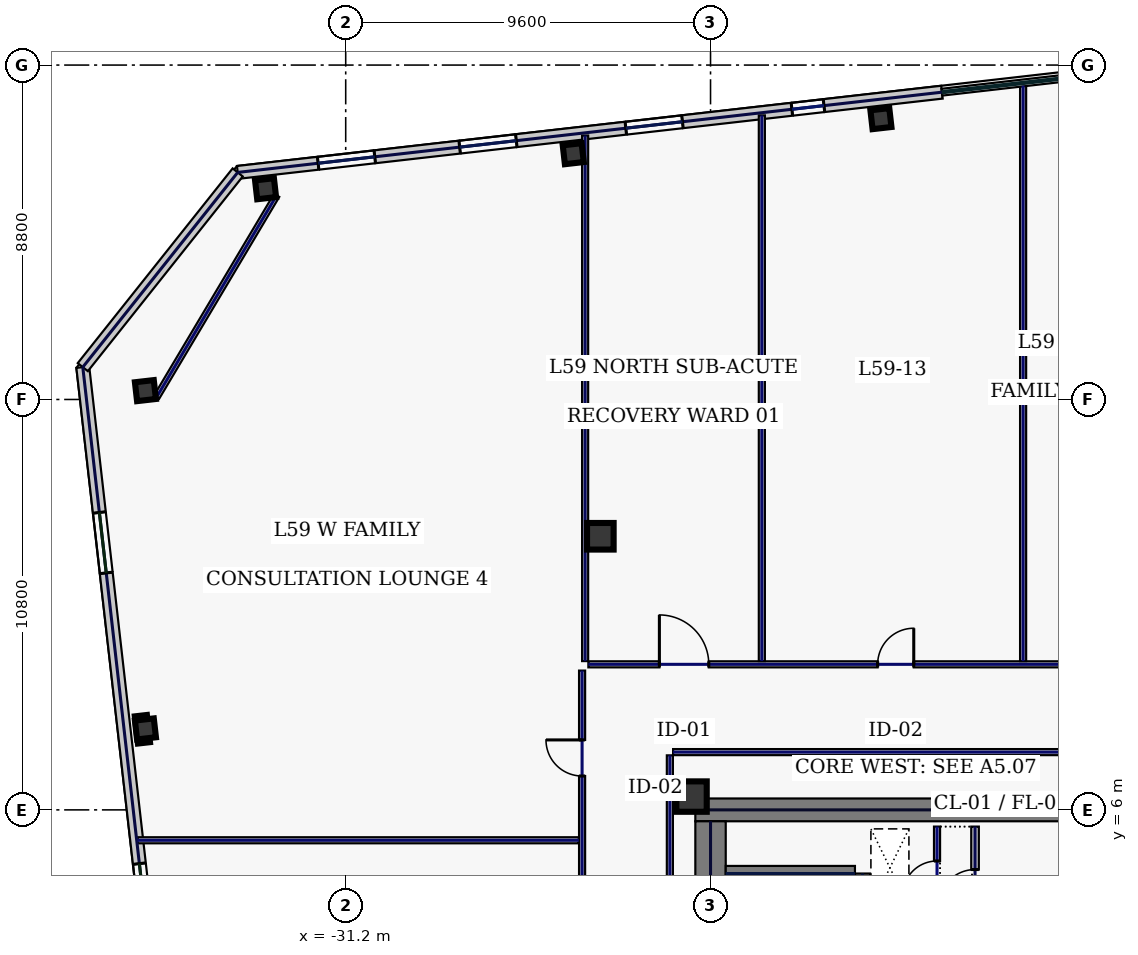
"""IFC4 building model, lengths in metres.
Left out: names, types, materials, properties, quantities, classifications, styles, units other than length and angle.
Written with IfcOpenShell. Run it as: python <this file> out.ifc"""

import sys

from ifc_helpers import new_model, si_unit, direction, frame, frame_2d, origin, origin_2d, place, context, subcontext, project, spatial, rectangle, hollow_rectangle, extrude, element, fill, save


model = new_model("IFC4")
c1 = context("Model", 3, precision=1e-05, world=origin(), true_north=direction((0.0, 1.0)))
c2 = subcontext(c1, "Body", "Model", "MODEL_VIEW")
j1 = project(units=[si_unit("LENGTHUNIT", "METRE"), si_unit("PLANEANGLEUNIT", "RADIAN")], contexts=[c1])
p1 = place(None, origin())
s1 = spatial("IfcSite", under=j1, at=p1, CompositionType="ELEMENT")
p2 = place(p1, origin())
s2 = spatial("IfcBuilding", under=s1, at=p2, CompositionType="ELEMENT")
p3 = place(p2, frame((0.0, 0.0, 255.0)))
s3 = spatial("IfcBuildingStorey", under=s2, at=p3, CompositionType="ELEMENT", Elevation=255.0)
p4 = place(p3, frame((-22.0, 6.0, 0.0), z_axis=(0.0, 0.0, 1.0), x_axis=(1.0, 0.0, 0.0)))
e1 = element("IfcWall", 1, at=p4, inside=s3, PredefinedType="SHEAR", context=c2, shape_type="SweptSolid", body=[
    extrude(rectangle(XDim=11.5, YDim=0.6, at=frame_2d((5.75, 0.0))), origin(), (0.0, 0.0, 1.0), 3.74),
])
p5 = place(p3, frame((-21.6, -5.7, 0.0), z_axis=(0.0, 0.0, 1.0), x_axis=(0.0, 1.0, 0.0)))
e2 = element("IfcWall", 2, at=p5, inside=s3, PredefinedType="SHEAR", context=c2, shape_type="SweptSolid", body=[
    extrude(rectangle(XDim=11.4, YDim=0.8, at=frame_2d((5.7, 0.0))), origin(), (0.0, 0.0, 1.0), 3.74),
])
p6 = place(p3, frame((-17.6, -4.325, 0.0), z_axis=(0.0, 0.0, 1.0), x_axis=(0.0, 1.0, 0.0)))
e3 = element("IfcWall", 3, at=p6, inside=s3, PredefinedType="SHEAR", context=c2, shape_type="SweptSolid", body=[
    extrude(rectangle(XDim=8.65, YDim=0.4, at=frame_2d((4.325, 0.0))), origin(), (0.0, 0.0, 1.0), 3.74),
])
p7 = place(p6, frame((0.25, 0.0, 0.0)))
e4 = element("IfcOpeningElement", 4, at=p7, cuts=e3, PredefinedType="OPENING", context=c2, shape_type="SweptSolid", body=[
    extrude(rectangle(XDim=1.1, YDim=2.2, at=frame_2d((0.55, 1.1))), frame((0.0, 0.21, 0.0), z_axis=(0.0, -1.0, 0.0), x_axis=(1.0, 0.0, 0.0)), (0.0, 0.0, 1.0), 0.42),
])
p8 = place(p3, frame((-21.2, 4.325, 0.0), z_axis=(0.0, 0.0, 1.0), x_axis=(1.0, 0.0, 0.0)))
e5 = element("IfcWall", 5, at=p8, inside=s3, PredefinedType="SHEAR", context=c2, shape_type="SweptSolid", body=[
    extrude(rectangle(XDim=3.4, YDim=0.4, at=frame_2d((1.7, 0.0))), origin(), (0.0, 0.0, 1.0), 3.74),
])
p9 = place(p3, frame((-22.1, 6.35, 0.0), z_axis=(0.0, 0.0, 1.0), x_axis=(1.0, 0.0, 0.0)))
e6 = element("IfcColumn", 6, at=p9, inside=s3, PredefinedType="COLUMN", context=c2, shape_type="SweptSolid", body=[
    extrude(hollow_rectangle(XDim=0.8, YDim=0.8, WallThickness=0.036, at=origin_2d()), origin(), (0.0, 0.0, 1.0), 3.74),
])
p10 = place(p3, frame((-24.5, 13.2, 0.0), z_axis=(0.0, 0.0, 1.0), x_axis=(1.0, 0.0, 0.0)))
e7 = element("IfcColumn", 7, at=p10, inside=s3, PredefinedType="COLUMN", context=c2, shape_type="SweptSolid", body=[
    extrude(hollow_rectangle(XDim=0.7, YDim=0.7, WallThickness=0.032, at=origin_2d()), origin(), (0.0, 0.0, 1.0), 3.74),
])
for number, where, z_axis, x_axis in (
    (8, (-17.116, 24.19, 0.0), (0.0, 0.0, 1.0), (0.994, 0.113, 0.0)),
    (9, (-25.212, 23.268, 0.0), (0.0, 0.0, 1.0), (0.994, 0.113, 0.0)),
    (10, (-33.309, 22.345, 0.0), (0.0, 0.0, 1.0), (0.994, 0.113, 0.0)),
    (11, (-36.47, 17.033, 0.0), (0.0, 0.0, 1.0), (0.994, 0.113, 0.0)),
    (12, (-36.47, 8.131, 0.0), (0.0, 0.0, 1.0), (0.994, 0.113, 0.0)),
):
    element("IfcColumn", number, at=place(p3, frame(where, z_axis=z_axis, x_axis=x_axis)), inside=s3, PredefinedType="COLUMN", context=c2, shape_type="SweptSolid", body=[
        extrude(hollow_rectangle(XDim=0.5, YDim=0.5, WallThickness=0.025, at=origin_2d()), origin(), (0.0, 0.0, 1.0), 3.74),
    ])
p11 = place(p3, frame((-15.51, 24.886, 0.0), z_axis=(0.0, 0.0, 1.0), x_axis=(-0.993572271362, -0.113199565282, 0.0)))
e13 = element("IfcWall", 13, at=p11, inside=s3, PredefinedType="STANDARD", context=c2, shape_type="SweptSolid", body=[
    extrude(rectangle(XDim=18.651, YDim=0.34, at=frame_2d((9.326, 0.0))), origin(), (0.0, 0.0, 1.0), 3.74),
])
p12 = place(p11, frame((15.021, 0.0, 0.83)))
e14 = element("IfcOpeningElement", 14, at=p12, cuts=e13, PredefinedType="OPENING", context=c2, shape_type="SweptSolid", body=[
    extrude(rectangle(XDim=1.5, YDim=2.0, at=frame_2d((0.75, 1.0))), frame((0.0, 0.18, 0.0), z_axis=(0.0, -1.0, 0.0), x_axis=(1.0, 0.0, 0.0)), (0.0, 0.0, 1.0), 0.36),
])
p13 = place(p11, frame((11.273, 0.0, 0.83)))
e15 = element("IfcOpeningElement", 15, at=p13, cuts=e13, PredefinedType="OPENING", context=c2, shape_type="SweptSolid", body=[
    extrude(rectangle(XDim=1.5, YDim=2.0, at=frame_2d((0.75, 1.0))), frame((0.0, 0.18, 0.0), z_axis=(0.0, -1.0, 0.0), x_axis=(1.0, 0.0, 0.0)), (0.0, 0.0, 1.0), 0.36),
])
p14 = place(p11, frame((6.873, 0.0, 0.83)))
e16 = element("IfcOpeningElement", 16, at=p14, cuts=e13, PredefinedType="OPENING", context=c2, shape_type="SweptSolid", body=[
    extrude(rectangle(XDim=1.5, YDim=2.0, at=frame_2d((0.75, 1.0))), frame((0.0, 0.18, 0.0), z_axis=(0.0, -1.0, 0.0), x_axis=(1.0, 0.0, 0.0)), (0.0, 0.0, 1.0), 0.36),
])
p15 = place(p11, frame((3.125, 0.0, 0.83)))
e17 = element("IfcOpeningElement", 17, at=p15, cuts=e13, PredefinedType="OPENING", context=c2, shape_type="SweptSolid", body=[
    extrude(rectangle(XDim=0.85, YDim=1.85, at=frame_2d((0.425, 0.925))), frame((0.0, 0.18, 0.0), z_axis=(0.0, -1.0, 0.0), x_axis=(1.0, 0.0, 0.0)), (0.0, 0.0, 1.0), 0.36),
])
p16 = place(p3, frame((-38.118, 17.651, 0.0), z_axis=(0.0, 0.0, 1.0), x_axis=(0.11320360501, -0.9935718111, 0.0)))
e18 = element("IfcWall", 18, at=p16, inside=s3, PredefinedType="STANDARD", context=c2, shape_type="SweptSolid", body=[
    extrude(rectangle(XDim=37.2, YDim=0.34, at=frame_2d((18.6, 0.0))), origin(), (0.0, 0.0, 1.0), 3.74),
])
p17 = place(p16, frame((3.85, 0.0, 0.58)))
e19 = element("IfcOpeningElement", 19, at=p17, cuts=e18, PredefinedType="OPENING", context=c2, shape_type="SweptSolid", body=[
    extrude(rectangle(XDim=1.6, YDim=2.3, at=frame_2d((0.8, 1.15))), frame((0.0, 0.18, 0.0), z_axis=(0.0, -1.0, 0.0), x_axis=(1.0, 0.0, 0.0)), (0.0, 0.0, 1.0), 0.36),
])
p18 = place(p16, frame((13.15, 0.0, 0.58)))
e20 = element("IfcOpeningElement", 20, at=p18, cuts=e18, PredefinedType="OPENING", context=c2, shape_type="SweptSolid", body=[
    extrude(rectangle(XDim=1.6, YDim=2.3, at=frame_2d((0.8, 1.15))), frame((0.0, 0.18, 0.0), z_axis=(0.0, -1.0, 0.0), x_axis=(1.0, 0.0, 0.0)), (0.0, 0.0, 1.0), 0.36),
])
p19 = place(p16, frame((31.75, 0.0, 0.58)))
e21 = element("IfcOpeningElement", 21, at=p19, cuts=e18, PredefinedType="OPENING", context=c2, shape_type="SweptSolid", body=[
    extrude(rectangle(XDim=1.6, YDim=2.3, at=frame_2d((0.8, 1.15))), frame((0.0, 0.18, 0.0), z_axis=(0.0, -1.0, 0.0), x_axis=(1.0, 0.0, 0.0)), (0.0, 0.0, 1.0), 0.36),
])
p20 = place(p3, frame((-34.042, 22.775, 0.0), z_axis=(0.0, 0.0, 1.0), x_axis=(-0.62252823689, -0.78259733853, 0.0)))
e22 = element("IfcWall", 22, at=p20, inside=s3, PredefinedType="STANDARD", context=c2, shape_type="SweptSolid", body=[
    extrude(rectangle(XDim=6.548, YDim=0.34, at=frame_2d((3.274, 0.0))), origin(), (0.0, 0.0, 1.0), 3.74),
])
p21 = place(p3, frame((-15.64, 3.405, 0.0), z_axis=(0.0, 0.0, 1.0), x_axis=(0.0, 1.0, 0.0)))
e23 = element("IfcWall", 23, at=p21, inside=s3, PredefinedType="PARTITIONING", context=c2, shape_type="SweptSolid", body=[
    extrude(rectangle(XDim=2.155, YDim=0.16, at=frame_2d((1.078, 0.0))), origin(), (0.0, 0.0, 1.0), 3.74),
])
p22 = place(p21, frame((0.35, 0.0, 0.0)))
e24 = element("IfcOpeningElement", 24, at=p22, cuts=e23, PredefinedType="OPENING", context=c2, shape_type="SweptSolid", body=[
    extrude(rectangle(XDim=0.9, YDim=2.2, at=frame_2d((0.45, 1.1))), frame((0.0, 0.09, 0.0), z_axis=(0.0, -1.0, 0.0), x_axis=(1.0, 0.0, 0.0)), (0.0, 0.0, 1.0), 0.18),
])
p23 = place(p3, frame((-14.64, 2.96, 0.0), z_axis=(0.0, 0.0, 1.0), x_axis=(0.0, 1.0, 0.0)))
e25 = element("IfcWall", 25, at=p23, inside=s3, PredefinedType="SOLIDWALL", context=c2, shape_type="SweptSolid", body=[
    extrude(rectangle(XDim=2.6, YDim=0.2, at=frame_2d((1.3, 0.0))), origin(), (0.0, 0.0, 1.0), 3.74),
])
p24 = place(p23, frame((0.52, 0.0, 0.0)))
e26 = element("IfcOpeningElement", 26, at=p24, cuts=e25, PredefinedType="OPENING", context=c2, shape_type="SweptSolid", body=[
    extrude(rectangle(XDim=0.95, YDim=2.2, at=frame_2d((0.475, 1.1))), frame((0.0, 0.11, 0.0), z_axis=(0.0, -1.0, 0.0), x_axis=(1.0, 0.0, 0.0)), (0.0, 0.0, 1.0), 0.22),
])
p25 = place(p3, frame((-33.016, 22.171, 0.0), z_axis=(0.0, 0.0, 1.0), x_axis=(-0.511385266265, -0.859351563359, 0.0)))
e27 = element("IfcWall", 27, at=p25, inside=s3, PredefinedType="PARTITIONING", context=c2, shape_type="SweptSolid", body=[
    extrude(rectangle(XDim=6.182, YDim=0.16, at=frame_2d((3.091, 0.0))), origin(), (0.0, 0.0, 1.0), 3.74),
])
p26 = place(p3, frame((-24.98, -9.615, 0.0), z_axis=(0.0, 0.0, 1.0), x_axis=(0.0, 1.0, 0.0)))
e28 = element("IfcWall", 28, at=p26, inside=s3, PredefinedType="PARTITIONING", context=c2, shape_type="SweptSolid", body=[
    extrude(rectangle(XDim=19.28, YDim=0.16, at=frame_2d((9.64, 0.0))), origin(), (0.0, 0.0, 1.0), 3.74),
])
p27 = place(p26, frame((1.969, 0.0, 0.0)))
e29 = element("IfcOpeningElement", 29, at=p27, cuts=e28, PredefinedType="OPENING", context=c2, shape_type="SweptSolid", body=[
    extrude(rectangle(XDim=0.95, YDim=2.2, at=frame_2d((0.475, 1.1))), frame((0.0, 0.09, 0.0), z_axis=(0.0, -1.0, 0.0), x_axis=(1.0, 0.0, 0.0)), (0.0, 0.0, 1.0), 0.18),
])
p28 = place(p26, frame((7.25, 0.0, 0.0)))
e30 = element("IfcOpeningElement", 30, at=p28, cuts=e28, PredefinedType="OPENING", context=c2, shape_type="SweptSolid", body=[
    extrude(rectangle(XDim=0.95, YDim=2.2, at=frame_2d((0.475, 1.1))), frame((0.0, 0.09, 0.0), z_axis=(0.0, -1.0, 0.0), x_axis=(1.0, 0.0, 0.0)), (0.0, 0.0, 1.0), 0.18),
])
p29 = place(p26, frame((12.45, 0.0, 0.0)))
e31 = element("IfcOpeningElement", 31, at=p29, cuts=e28, PredefinedType="OPENING", context=c2, shape_type="SweptSolid", body=[
    extrude(rectangle(XDim=0.95, YDim=2.2, at=frame_2d((0.475, 1.1))), frame((0.0, 0.09, 0.0), z_axis=(0.0, -1.0, 0.0), x_axis=(1.0, 0.0, 0.0)), (0.0, 0.0, 1.0), 0.18),
])
p30 = place(p26, frame((16.506, 0.0, 0.0)))
e32 = element("IfcOpeningElement", 32, at=p30, cuts=e28, PredefinedType="OPENING", context=c2, shape_type="SweptSolid", body=[
    extrude(rectangle(XDim=0.95, YDim=2.2, at=frame_2d((0.475, 1.1))), frame((0.0, 0.09, 0.0), z_axis=(0.0, -1.0, 0.0), x_axis=(1.0, 0.0, 0.0)), (0.0, 0.0, 1.0), 0.18),
])
p31 = place(p3, frame((-24.815, 9.83, 0.0), z_axis=(0.0, 0.0, 1.0), x_axis=(1.0, 0.0, 0.0)))
e33 = element("IfcWall", 33, at=p31, inside=s3, PredefinedType="PARTITIONING", context=c2, shape_type="SweptSolid", body=[
    extrude(rectangle(XDim=49.63, YDim=0.16, at=frame_2d((24.815, 0.0))), origin(), (0.0, 0.0, 1.0), 3.74),
])
p32 = place(p31, frame((1.869, 0.0, 0.0)))
e34 = element("IfcOpeningElement", 34, at=p32, cuts=e33, PredefinedType="OPENING", context=c2, shape_type="SweptSolid", body=[
    extrude(rectangle(XDim=1.3, YDim=2.2, at=frame_2d((0.65, 1.1))), frame((0.0, 0.09, 0.0), z_axis=(0.0, -1.0, 0.0), x_axis=(1.0, 0.0, 0.0)), (0.0, 0.0, 1.0), 0.18),
])
p33 = place(p31, frame((7.613, 0.0, 0.0)))
e35 = element("IfcOpeningElement", 35, at=p33, cuts=e33, PredefinedType="OPENING", context=c2, shape_type="SweptSolid", body=[
    extrude(rectangle(XDim=0.95, YDim=2.2, at=frame_2d((0.475, 1.1))), frame((0.0, 0.09, 0.0), z_axis=(0.0, -1.0, 0.0), x_axis=(1.0, 0.0, 0.0)), (0.0, 0.0, 1.0), 0.18),
])
p34 = place(p31, frame((14.038, 0.0, 0.0)))
e36 = element("IfcOpeningElement", 36, at=p34, cuts=e33, PredefinedType="OPENING", context=c2, shape_type="SweptSolid", body=[
    extrude(rectangle(XDim=0.95, YDim=2.2, at=frame_2d((0.475, 1.1))), frame((0.0, 0.09, 0.0), z_axis=(0.0, -1.0, 0.0), x_axis=(1.0, 0.0, 0.0)), (0.0, 0.0, 1.0), 0.18),
])
p35 = place(p31, frame((21.125, 0.0, 0.0)))
e37 = element("IfcOpeningElement", 37, at=p35, cuts=e33, PredefinedType="OPENING", context=c2, shape_type="SweptSolid", body=[
    extrude(rectangle(XDim=1.3, YDim=2.2, at=frame_2d((0.65, 1.1))), frame((0.0, 0.09, 0.0), z_axis=(0.0, -1.0, 0.0), x_axis=(1.0, 0.0, 0.0)), (0.0, 0.0, 1.0), 0.18),
])
p36 = place(p31, frame((29.225, 0.0, 0.0)))
e38 = element("IfcOpeningElement", 38, at=p36, cuts=e33, PredefinedType="OPENING", context=c2, shape_type="SweptSolid", body=[
    extrude(rectangle(XDim=1.3, YDim=2.2, at=frame_2d((0.65, 1.1))), frame((0.0, 0.09, 0.0), z_axis=(0.0, -1.0, 0.0), x_axis=(1.0, 0.0, 0.0)), (0.0, 0.0, 1.0), 0.18),
])
p37 = place(p31, frame((36.312, 0.0, 0.0)))
e39 = element("IfcOpeningElement", 39, at=p37, cuts=e33, PredefinedType="OPENING", context=c2, shape_type="SweptSolid", body=[
    extrude(rectangle(XDim=0.95, YDim=2.2, at=frame_2d((0.475, 1.1))), frame((0.0, 0.09, 0.0), z_axis=(0.0, -1.0, 0.0), x_axis=(1.0, 0.0, 0.0)), (0.0, 0.0, 1.0), 0.18),
])
p38 = place(p31, frame((41.863, 0.0, 0.0)))
e40 = element("IfcOpeningElement", 40, at=p38, cuts=e33, PredefinedType="OPENING", context=c2, shape_type="SweptSolid", body=[
    extrude(rectangle(XDim=1.3, YDim=2.2, at=frame_2d((0.65, 1.1))), frame((0.0, 0.09, 0.0), z_axis=(0.0, -1.0, 0.0), x_axis=(1.0, 0.0, 0.0)), (0.0, 0.0, 1.0), 0.18),
])
p39 = place(p31, frame((46.806, 0.0, 0.0)))
e41 = element("IfcOpeningElement", 41, at=p39, cuts=e33, PredefinedType="OPENING", context=c2, shape_type="SweptSolid", body=[
    extrude(rectangle(XDim=0.95, YDim=2.2, at=frame_2d((0.475, 1.1))), frame((0.0, 0.09, 0.0), z_axis=(0.0, -1.0, 0.0), x_axis=(1.0, 0.0, 0.0)), (0.0, 0.0, 1.0), 0.18),
])
p40 = place(p3, frame((-10.715, 7.52, 0.0), z_axis=(0.0, 0.0, 1.0), x_axis=(-1.0, 0.0, 0.0)))
e42 = element("IfcWall", 42, at=p40, inside=s3, PredefinedType="PARTITIONING", context=c2, shape_type="SweptSolid", body=[
    extrude(rectangle(XDim=11.87, YDim=0.16, at=frame_2d((5.935, 0.0))), origin(), (0.0, 0.0, 1.0), 3.74),
])
p41 = place(p3, frame((-22.67, 7.435, 0.0), z_axis=(0.0, 0.0, 1.0), x_axis=(0.0, -1.0, 0.0)))
e43 = element("IfcWall", 43, at=p41, inside=s3, PredefinedType="PARTITIONING", context=c2, shape_type="SweptSolid", body=[
    extrude(rectangle(XDim=14.82, YDim=0.16, at=frame_2d((7.41, 0.0))), origin(), (0.0, 0.0, 1.0), 3.74),
])
p42 = place(p3, frame((-24.9, 9.915, 0.0), z_axis=(0.0, 0.0, 1.0), x_axis=(0.0, 1.0, 0.0)))
e44 = element("IfcWall", 44, at=p42, inside=s3, PredefinedType="PARTITIONING", context=c2, shape_type="SweptSolid", body=[
    extrude(rectangle(XDim=13.831, YDim=0.16, at=frame_2d((6.916, 0.0))), origin(), (0.0, 0.0, 1.0), 3.285),
])
p43 = place(p3, frame((-20.25, 9.915, 0.0), z_axis=(0.0, 0.0, 1.0), x_axis=(0.0, 1.0, 0.0)))
e45 = element("IfcWall", 45, at=p43, inside=s3, PredefinedType="PARTITIONING", context=c2, shape_type="SweptSolid", body=[
    extrude(rectangle(XDim=14.361, YDim=0.16, at=frame_2d((7.181, 0.0))), origin(), (0.0, 0.0, 1.0), 3.74),
])
p44 = place(p3, frame((-13.375, 9.915, 0.0), z_axis=(0.0, 0.0, 1.0), x_axis=(0.0, 1.0, 0.0)))
e46 = element("IfcWall", 46, at=p44, inside=s3, PredefinedType="PARTITIONING", context=c2, shape_type="SweptSolid", body=[
    extrude(rectangle(XDim=15.144, YDim=0.16, at=frame_2d((7.572, 0.0))), origin(), (0.0, 0.0, 1.0), 3.74),
])
p45 = place(p3, frame((-36.679, 5.2, 0.0), z_axis=(0.0, 0.0, 1.0), x_axis=(1.0, 0.0, 0.0)))
e47 = element("IfcWall", 47, at=p45, inside=s3, PredefinedType="PARTITIONING", context=c2, shape_type="SweptSolid", body=[
    extrude(rectangle(XDim=11.615, YDim=0.16, at=frame_2d((5.807, 0.0))), origin(), (0.0, 0.0, 1.0), 3.74),
])
p46 = place(p12, origin())
e48 = element("IfcWindow", 48, at=p46, inside=s3, PartitioningType="SINGLE_PANEL", PredefinedType="WINDOW", context=c2, shape_type="SweptSolid", body=[
    extrude(rectangle(XDim=1.5, YDim=2.0, at=frame_2d((0.75, 1.0))), frame((0.0, 0.03, 0.0), z_axis=(0.0, -1.0, 0.0), x_axis=(1.0, 0.0, 0.0)), (0.0, 0.0, 1.0), 0.06),
])
fill(e14, e48)
p47 = place(p13, origin())
e49 = element("IfcWindow", 49, at=p47, inside=s3, PartitioningType="SINGLE_PANEL", PredefinedType="WINDOW", context=c2, shape_type="SweptSolid", body=[
    extrude(rectangle(XDim=1.5, YDim=2.0, at=frame_2d((0.75, 1.0))), frame((0.0, 0.03, 0.0), z_axis=(0.0, -1.0, 0.0), x_axis=(1.0, 0.0, 0.0)), (0.0, 0.0, 1.0), 0.06),
])
fill(e15, e49)
p48 = place(p14, origin())
e50 = element("IfcWindow", 50, at=p48, inside=s3, PartitioningType="SINGLE_PANEL", PredefinedType="WINDOW", context=c2, shape_type="SweptSolid", body=[
    extrude(rectangle(XDim=1.5, YDim=2.0, at=frame_2d((0.75, 1.0))), frame((0.0, 0.03, 0.0), z_axis=(0.0, -1.0, 0.0), x_axis=(1.0, 0.0, 0.0)), (0.0, 0.0, 1.0), 0.06),
])
fill(e16, e50)
p49 = place(p15, origin())
e51 = element("IfcWindow", 51, at=p49, inside=s3, PartitioningType="SINGLE_PANEL", PredefinedType="WINDOW", context=c2, shape_type="SweptSolid", body=[
    extrude(rectangle(XDim=0.85, YDim=1.85, at=frame_2d((0.425, 0.925))), frame((0.0, 0.03, 0.0), z_axis=(0.0, -1.0, 0.0), x_axis=(1.0, 0.0, 0.0)), (0.0, 0.0, 1.0), 0.06),
])
fill(e17, e51)
p50 = place(p17, origin())
e52 = element("IfcWindow", 52, at=p50, inside=s3, PartitioningType="SINGLE_PANEL", PredefinedType="WINDOW", context=c2, shape_type="SweptSolid", body=[
    extrude(rectangle(XDim=1.6, YDim=2.3, at=frame_2d((0.8, 1.15))), frame((0.0, 0.03, 0.0), z_axis=(0.0, -1.0, 0.0), x_axis=(1.0, 0.0, 0.0)), (0.0, 0.0, 1.0), 0.06),
])
fill(e19, e52)
p51 = place(p18, origin())
e53 = element("IfcWindow", 53, at=p51, inside=s3, PartitioningType="SINGLE_PANEL", PredefinedType="WINDOW", context=c2, shape_type="SweptSolid", body=[
    extrude(rectangle(XDim=1.6, YDim=2.3, at=frame_2d((0.8, 1.15))), frame((0.0, 0.03, 0.0), z_axis=(0.0, -1.0, 0.0), x_axis=(1.0, 0.0, 0.0)), (0.0, 0.0, 1.0), 0.06),
])
fill(e20, e53)
p52 = place(p22, origin())
e54 = element("IfcDoor", 54, at=p52, inside=s3, OperationType="SINGLE_SWING_LEFT", PredefinedType="DOOR", context=c2, shape_type="SweptSolid", body=[
    extrude(rectangle(XDim=0.9, YDim=2.2, at=frame_2d((0.45, 1.1))), frame((0.0, 0.025, 0.0), z_axis=(0.0, -1.0, 0.0), x_axis=(1.0, 0.0, 0.0)), (0.0, 0.0, 1.0), 0.05),
])
fill(e24, e54)
p53 = place(p24, origin())
e55 = element("IfcDoor", 55, at=p53, inside=s3, OperationType="SINGLE_SWING_LEFT", PredefinedType="DOOR", context=c2, shape_type="SweptSolid", body=[
    extrude(rectangle(XDim=0.95, YDim=2.2, at=frame_2d((0.475, 1.1))), frame((0.0, 0.025, 0.0), z_axis=(0.0, -1.0, 0.0), x_axis=(1.0, 0.0, 0.0)), (0.0, 0.0, 1.0), 0.05),
])
fill(e26, e55)
p54 = place(p32, origin())
e56 = element("IfcDoor", 56, at=p54, inside=s3, OperationType="SINGLE_SWING_LEFT", PredefinedType="DOOR", context=c2, shape_type="SweptSolid", body=[
    extrude(rectangle(XDim=1.3, YDim=2.2, at=frame_2d((0.65, 1.1))), frame((0.0, 0.025, 0.0), z_axis=(0.0, -1.0, 0.0), x_axis=(1.0, 0.0, 0.0)), (0.0, 0.0, 1.0), 0.05),
])
fill(e34, e56)
p55 = place(p33, origin())
e57 = element("IfcDoor", 57, at=p55, inside=s3, OperationType="SINGLE_SWING_RIGHT", PredefinedType="DOOR", context=c2, shape_type="SweptSolid", body=[
    extrude(rectangle(XDim=0.95, YDim=2.2, at=frame_2d((0.475, 1.1))), frame((0.0, 0.025, 0.0), z_axis=(0.0, -1.0, 0.0), x_axis=(1.0, 0.0, 0.0)), (0.0, 0.0, 1.0), 0.05),
])
fill(e35, e57)
p56 = place(p30, origin())
e58 = element("IfcDoor", 58, at=p56, inside=s3, OperationType="SINGLE_SWING_RIGHT", PredefinedType="DOOR", context=c2, shape_type="SweptSolid", body=[
    extrude(rectangle(XDim=0.95, YDim=2.2, at=frame_2d((0.475, 1.1))), frame((0.0, 0.025, 0.0), z_axis=(0.0, -1.0, 0.0), x_axis=(1.0, 0.0, 0.0)), (0.0, 0.0, 1.0), 0.05),
])
fill(e32, e58)
save(model, sys.argv[1])
